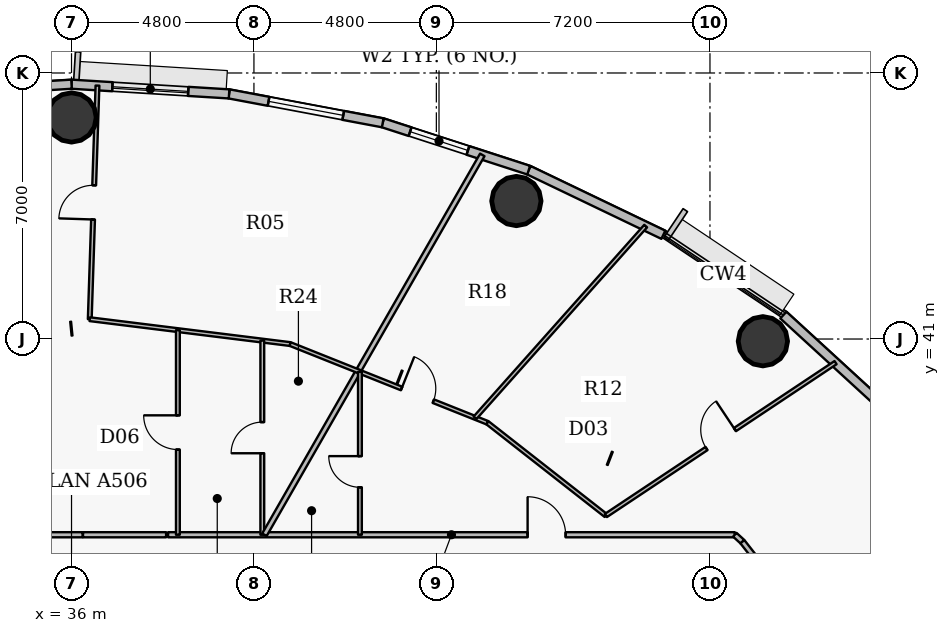
"""IFC4 building model, lengths in metres.
Left out: names, types, materials, properties, quantities, classifications, styles, units other than length and angle.
Written with IfcOpenShell. Run it as: python <this file> out.ifc"""

import sys

from ifc_helpers import new_model, si_unit, direction, frame, frame_2d, origin, origin_2d, place, context, subcontext, project, spatial, rectangle, hollow_circle, extrude, source, transform, mapped, element, fill, save


model = new_model("IFC4")
c1 = context("Model", 3, precision=1e-05, world=origin(), true_north=direction((0.0, 1.0)))
c2 = subcontext(c1, "Body", "Model", "MODEL_VIEW")
j1 = project(units=[si_unit("LENGTHUNIT", "METRE"), si_unit("PLANEANGLEUNIT", "RADIAN")], contexts=[c1])
p1 = place(None, origin())
s1 = spatial("IfcSite", under=j1, at=p1, CompositionType="ELEMENT")
p2 = place(p1, origin())
s2 = spatial("IfcBuilding", under=s1, at=p2, CompositionType="ELEMENT")
p3 = place(p2, frame((0.0, 0.0, 193.65)))
s3 = spatial("IfcBuildingStorey", under=s2, at=p3, CompositionType="ELEMENT", Elevation=193.65)
for number, where, z_axis, x_axis in (
    (1, (54.192, 40.942, 0.0), (0.0, 0.0, 1.0), (1.0, 0.0, 0.0)),
    (2, (47.706, 44.631, 0.0), (0.0, 0.0, 1.0), (1.0, 0.0, 0.0)),
    (3, (36.0, 46.83, 0.0), (0.0, 0.0, 1.0), (1.0, 0.0, 0.0)),
):
    element("IfcColumn", number, at=place(p3, frame(where, z_axis=z_axis, x_axis=x_axis)), inside=s3, PredefinedType="COLUMN", context=c2, shape_type="SweptSolid", body=[
        extrude(hollow_circle(Radius=0.65, WallThickness=0.04, at=origin_2d()), origin(), (0.0, 0.0, 1.0), 3.75),
    ])
p4 = place(p3, frame((54.732, 41.631, 0.0), z_axis=(0.0, 0.0, 1.0), x_axis=(0.737076565834, -0.675809245349, 0.0)))
e4 = element("IfcWall", 4, at=p4, inside=s3, PredefinedType="SOLIDWALL", context=c2, shape_type="SweptSolid", body=[
    extrude(rectangle(XDim=3.658, YDim=0.24, at=frame_2d((1.829, 0.0))), origin(), (0.0, 0.0, 1.0), 3.5),
])
p5 = place(p3, frame((48.03, 45.444, 0.0), z_axis=(0.0, 0.0, 1.0), x_axis=(0.901564733809, -0.432644231155, 0.0)))
e5 = element("IfcWall", 5, at=p5, inside=s3, PredefinedType="SOLIDWALL", context=c2, shape_type="SweptSolid", body=[
    extrude(rectangle(XDim=3.93, YDim=0.24, at=frame_2d((1.965, 0.0))), origin(), (0.0, 0.0, 1.0), 3.5),
])
p6 = place(p3, frame((44.189, 46.689, 0.0), z_axis=(0.0, 0.0, 1.0), x_axis=(0.951209870236, -0.30854462038, 0.0)))
e6 = element("IfcWall", 6, at=p6, inside=s3, PredefinedType="SOLIDWALL", context=c2, shape_type="SweptSolid", body=[
    extrude(rectangle(XDim=4.038, YDim=0.24, at=frame_2d((2.019, 0.0))), origin(), (0.0, 0.0, 1.0), 3.5),
])
p7 = place(p6, frame((0.757, 0.0, 0.9)))
e7 = element("IfcOpeningElement", 7, at=p7, cuts=e6, PredefinedType="OPENING", context=c2, shape_type="SweptSolid", body=[
    extrude(rectangle(XDim=1.6, YDim=1.75, at=origin_2d()), frame((0.8, 0.13, 0.875), z_axis=(0.0, -1.0, 0.0), x_axis=(1.0, 0.0, 0.0)), (0.0, 0.0, 1.0), 0.26),
])
p8 = place(p3, frame((40.146, 47.449, 0.0), z_axis=(0.0, 0.0, 1.0), x_axis=(0.982788108205, -0.184736391573, 0.0)))
e8 = element("IfcWall", 8, at=p8, inside=s3, PredefinedType="SOLIDWALL", context=c2, shape_type="SweptSolid", body=[
    extrude(rectangle(XDim=4.114, YDim=0.24, at=frame_2d((2.057, 0.0))), origin(), (0.0, 0.0, 1.0), 3.5),
])
p9 = place(p8, frame((1.057, 0.0, 0.9)))
e9 = element("IfcOpeningElement", 9, at=p9, cuts=e8, PredefinedType="OPENING", context=c2, shape_type="SweptSolid", body=[
    extrude(rectangle(XDim=2.0, YDim=1.75, at=origin_2d()), frame((1.0, 0.13, 0.875), z_axis=(0.0, -1.0, 0.0), x_axis=(1.0, 0.0, 0.0)), (0.0, 0.0, 1.0), 0.26),
])
p10 = place(p3, frame((36.0, 47.705, 0.0), z_axis=(0.0, 0.0, 1.0), x_axis=(0.998104600619, -0.061540281305, 0.0)))
e10 = element("IfcWall", 10, at=p10, inside=s3, PredefinedType="SOLIDWALL", context=c2, shape_type="SweptSolid", body=[
    extrude(rectangle(XDim=4.154, YDim=0.24, at=frame_2d((2.077, 0.0))), origin(), (0.0, 0.0, 1.0), 3.5),
])
p11 = place(p10, frame((1.077, 0.0, 0.9)))
e11 = element("IfcOpeningElement", 11, at=p11, cuts=e10, PredefinedType="OPENING", context=c2, shape_type="SweptSolid", body=[
    extrude(rectangle(XDim=2.0, YDim=1.75, at=origin_2d()), frame((1.0, 0.13, 0.875), z_axis=(0.0, -1.0, 0.0), x_axis=(1.0, 0.0, 0.0)), (0.0, 0.0, 1.0), 0.26),
])
p12 = place(p3, frame((31.854, 47.449, 0.0), z_axis=(0.0, 0.0, 1.0), x_axis=(0.998104600619, 0.061540281305, 0.0)))
e12 = element("IfcWall", 12, at=p12, inside=s3, PredefinedType="SOLIDWALL", context=c2, shape_type="SweptSolid", body=[
    extrude(rectangle(XDim=4.154, YDim=0.24, at=frame_2d((2.077, 0.0))), origin(), (0.0, 0.0, 1.0), 3.5),
])
p13 = place(p12, frame((1.077, 0.0, 0.9)))
e13 = element("IfcOpeningElement", 13, at=p13, cuts=e12, PredefinedType="OPENING", context=c2, shape_type="SweptSolid", body=[
    extrude(rectangle(XDim=2.0, YDim=1.75, at=origin_2d()), frame((1.0, 0.13, 0.875), z_axis=(0.0, -1.0, 0.0), x_axis=(1.0, 0.0, 0.0)), (0.0, 0.0, 1.0), 0.26),
])
p14 = place(p3, frame((24.35, 35.85, 0.0), z_axis=(0.0, 0.0, 1.0), x_axis=(1.0, 0.0, 0.0)))
e14 = element("IfcWall", 14, at=p14, inside=s3, PredefinedType="PARTITIONING", context=c2, shape_type="SweptSolid", body=[
    extrude(rectangle(XDim=11.942, YDim=0.135, at=frame_2d((5.971, 0.0))), origin(), (0.0, 0.0, 1.0), 2.935),
])
p15 = place(p14, frame((5.471, 0.0, 0.0)))
e15 = element("IfcOpeningElement", 15, at=p15, cuts=e14, PredefinedType="OPENING", context=c2, shape_type="SweptSolid", body=[
    extrude(rectangle(XDim=1.0, YDim=2.15, at=origin_2d()), frame((0.5, 0.078, 1.075), z_axis=(0.0, -1.0, 0.0), x_axis=(1.0, 0.0, 0.0)), (0.0, 0.0, 1.0), 0.155),
])
p16 = place(p3, frame((36.48, 41.521, 0.0), z_axis=(0.0, 0.0, 1.0), x_axis=(0.033029315495, 0.99945438331, 0.0)))
e16 = element("IfcWall", 16, at=p16, inside=s3, PredefinedType="PARTITIONING", context=c2, shape_type="SweptSolid", body=[
    extrude(rectangle(XDim=6.15, YDim=0.1, at=frame_2d((3.075, 0.0))), origin(), (0.0, 0.0, 1.0), 2.935),
])
p17 = place(p16, frame((2.625, 0.0, 0.0)))
e17 = element("IfcOpeningElement", 17, at=p17, cuts=e16, PredefinedType="OPENING", context=c2, shape_type="SweptSolid", body=[
    extrude(rectangle(XDim=0.9, YDim=2.1, at=origin_2d()), frame((0.45, 0.06, 1.05), z_axis=(0.0, -1.0, 0.0), x_axis=(1.0, 0.0, 0.0)), (0.0, 0.0, 1.0), 0.12),
])
p18 = place(p3, frame((36.48, 41.521, 0.0), z_axis=(0.0, 0.0, 1.0), x_axis=(0.992397562131, -0.123073468612, 0.0)))
e18 = element("IfcWall", 18, at=p18, inside=s3, PredefinedType="PARTITIONING", context=c2, shape_type="SweptSolid", body=[
    extrude(rectangle(XDim=5.314, YDim=0.1, at=frame_2d((2.657, 0.0))), origin(), (0.0, 0.0, 1.0), 3.5),
])
p19 = place(p3, frame((38.541, 35.85, 0.0), z_axis=(0.0, 0.0, 1.0), x_axis=(1.0, 0.0, 0.0)))
e19 = element("IfcWall", 19, at=p19, inside=s3, PredefinedType="PARTITIONING", context=c2, shape_type="SweptSolid", body=[
    extrude(rectangle(XDim=14.913, YDim=0.135, at=frame_2d((7.456, 0.0))), origin(), (0.0, 0.0, 1.0), 2.935),
])
p20 = place(p19, frame((9.46, 0.0, 0.0)))
e20 = element("IfcOpeningElement", 20, at=p20, cuts=e19, PredefinedType="OPENING", context=c2, shape_type="SweptSolid", body=[
    extrude(rectangle(XDim=1.0, YDim=2.15, at=origin_2d()), frame((0.5, 0.078, 1.075), z_axis=(0.0, -1.0, 0.0), x_axis=(1.0, 0.0, 0.0)), (0.0, 0.0, 1.0), 0.155),
])
p21 = place(p3, frame((38.799, 35.85, 0.0), z_axis=(0.0, 0.0, 1.0), x_axis=(0.0, 1.0, 0.0)))
e21 = element("IfcWall", 21, at=p21, inside=s3, PredefinedType="PARTITIONING", context=c2, shape_type="SweptSolid", body=[
    extrude(rectangle(XDim=5.384, YDim=0.1, at=frame_2d((2.692, 0.0))), origin(), (0.0, 0.0, 1.0), 3.5),
])
p22 = place(p21, frame((2.242, 0.0, 0.0)))
e22 = element("IfcOpeningElement", 22, at=p22, cuts=e21, PredefinedType="OPENING", context=c2, shape_type="SweptSolid", body=[
    extrude(rectangle(XDim=0.9, YDim=2.1, at=origin_2d()), frame((0.45, 0.06, 1.05), z_axis=(0.0, -1.0, 0.0), x_axis=(1.0, 0.0, 0.0)), (0.0, 0.0, 1.0), 0.12),
])
p23 = place(p3, frame((41.02, 35.85, 0.0), z_axis=(0.0, 0.0, 1.0), x_axis=(0.0, 1.0, 0.0)))
e23 = element("IfcWall", 23, at=p23, inside=s3, PredefinedType="PARTITIONING", context=c2, shape_type="SweptSolid", body=[
    extrude(rectangle(XDim=5.108, YDim=0.1, at=frame_2d((2.554, 0.0))), origin(), (0.0, 0.0, 1.0), 3.5),
])
p24 = place(p23, frame((2.144, 0.0, 0.0)))
e24 = element("IfcOpeningElement", 24, at=p24, cuts=e23, PredefinedType="OPENING", context=c2, shape_type="SweptSolid", body=[
    extrude(rectangle(XDim=0.82, YDim=2.1, at=origin_2d()), frame((0.41, 0.06, 1.05), z_axis=(0.0, -1.0, 0.0), x_axis=(1.0, 0.0, 0.0)), (0.0, 0.0, 1.0), 0.12),
])
p25 = place(p3, frame((41.076, 35.85, 0.0), z_axis=(0.0, 0.0, 1.0), x_axis=(0.497557605347, 0.867430936364, 0.0)))
e25 = element("IfcWall", 25, at=p25, inside=s3, PredefinedType="PARTITIONING", context=c2, shape_type="SweptSolid", body=[
    extrude(rectangle(XDim=11.522, YDim=0.135, at=frame_2d((5.761, 0.0))), origin(), (0.0, 0.0, 1.0), 2.935),
])
p26 = place(p3, frame((41.754, 40.867, 0.0), z_axis=(0.0, 0.0, 1.0), x_axis=(0.928792710591, -0.370599650233, 0.0)))
e26 = element("IfcWall", 26, at=p26, inside=s3, PredefinedType="PARTITIONING", context=c2, shape_type="SweptSolid", body=[
    extrude(rectangle(XDim=5.588, YDim=0.1, at=frame_2d((2.794, 0.0))), origin(), (0.0, 0.0, 1.0), 2.935),
])
p27 = place(p26, frame((3.156, 0.0, 0.0)))
e27 = element("IfcOpeningElement", 27, at=p27, cuts=e26, PredefinedType="OPENING", context=c2, shape_type="SweptSolid", body=[
    extrude(rectangle(XDim=0.9, YDim=2.1, at=origin_2d()), frame((0.45, 0.06, 1.05), z_axis=(0.0, -1.0, 0.0), x_axis=(1.0, 0.0, 0.0)), (0.0, 0.0, 1.0), 0.12),
])
p28 = place(p3, frame((43.589, 35.85, 0.0), z_axis=(0.0, 0.0, 1.0), x_axis=(0.0, 1.0, 0.0)))
e28 = element("IfcWall", 28, at=p28, inside=s3, PredefinedType="PARTITIONING", context=c2, shape_type="SweptSolid", body=[
    extrude(rectangle(XDim=4.285, YDim=0.1, at=frame_2d((2.143, 0.0))), origin(), (0.0, 0.0, 1.0), 2.935),
])
p29 = place(p28, frame((1.249, 0.0, 0.0)))
e29 = element("IfcOpeningElement", 29, at=p29, cuts=e28, PredefinedType="OPENING", context=c2, shape_type="SweptSolid", body=[
    extrude(rectangle(XDim=0.82, YDim=2.1, at=origin_2d()), frame((0.41, 0.06, 1.05), z_axis=(0.0, -1.0, 0.0), x_axis=(1.0, 0.0, 0.0)), (0.0, 0.0, 1.0), 0.12),
])
p30 = place(p3, frame((46.617, 38.927, 0.0), z_axis=(0.0, 0.0, 1.0), x_axis=(0.664908846083, 0.746924511849, 0.0)))
e30 = element("IfcWall", 30, at=p30, inside=s3, PredefinedType="PARTITIONING", context=c2, shape_type="SweptSolid", body=[
    extrude(rectangle(XDim=6.754, YDim=0.1, at=frame_2d((3.377, 0.0))), origin(), (0.0, 0.0, 1.0), 2.935),
])
p31 = place(p3, frame((46.945, 38.796, 0.0), z_axis=(0.0, 0.0, 1.0), x_axis=(0.787314896848, -0.616551095369, 0.0)))
e31 = element("IfcWall", 31, at=p31, inside=s3, PredefinedType="PARTITIONING", context=c2, shape_type="SweptSolid", body=[
    extrude(rectangle(XDim=3.958, YDim=0.1, at=frame_2d((1.979, 0.0))), origin(), (0.0, 0.0, 1.0), 2.935),
])
p32 = place(p3, frame((50.06, 36.356, 0.0), z_axis=(0.0, 0.0, 1.0), x_axis=(0.832520763353, 0.553993843455, 0.0)))
e32 = element("IfcWall", 32, at=p32, inside=s3, PredefinedType="PARTITIONING", context=c2, shape_type="SweptSolid", body=[
    extrude(rectangle(XDim=7.26, YDim=0.1, at=frame_2d((3.63, 0.0))), origin(), (0.0, 0.0, 1.0), 2.935),
])
p33 = place(p32, frame((3.18, 0.0, 0.0)))
e33 = element("IfcOpeningElement", 33, at=p33, cuts=e32, PredefinedType="OPENING", context=c2, shape_type="SweptSolid", body=[
    extrude(rectangle(XDim=0.9, YDim=2.1, at=origin_2d()), frame((0.45, 0.06, 1.05), z_axis=(0.0, -1.0, 0.0), x_axis=(1.0, 0.0, 0.0)), (0.0, 0.0, 1.0), 0.12),
])
p34 = place(p3, frame((53.454, 35.85, 0.0), z_axis=(0.0, 0.0, 1.0), x_axis=(0.736667385572, -0.676255249913, 0.0)))
e34 = element("IfcWall", 34, at=p34, inside=s3, PredefinedType="PARTITIONING", context=c2, shape_type="SweptSolid", body=[
    extrude(rectangle(XDim=0.271, YDim=0.135, at=frame_2d((0.135, 0.0))), origin(), (0.0, 0.0, 1.0), 3.5),
])
p35 = place(p3, frame((53.653, 35.667, 0.0), z_axis=(0.0, 0.0, 1.0), x_axis=(0.616302223209, -0.787509726713, 0.0)))
e35 = element("IfcWall", 35, at=p35, inside=s3, PredefinedType="PARTITIONING", context=c2, shape_type="SweptSolid", body=[
    extrude(rectangle(XDim=2.18, YDim=0.135, at=frame_2d((1.09, 0.0))), origin(), (0.0, 0.0, 1.0), 3.5),
])
p36 = place(p3, frame((36.302, 35.85, 0.0), z_axis=(0.0, 0.0, 1.0), x_axis=(1.0, 0.0, 0.0)))
e36 = element("IfcWall", 36, at=p36, inside=s3, PredefinedType="PARTITIONING", context=c2, shape_type="SweptSolid", body=[
    extrude(rectangle(XDim=2.187, YDim=0.135, at=frame_2d((1.093, 0.0))), origin(), (0.0, 0.0, 1.0), 3.5),
])
m1 = source(origin(), c2, "Body", "SweptSolid", [
    extrude(rectangle(XDim=1.6, YDim=1.75, at=origin_2d()), frame((0.8, 0.03, 0.875), z_axis=(0.0, -1.0, 0.0), x_axis=(1.0, 0.0, 0.0)), (0.0, 0.0, 1.0), 0.06),
])
p37 = place(p7, origin())
e37 = element("IfcWindow", 37, at=p37, inside=s3, PartitioningType="DOUBLE_PANEL_VERTICAL", PredefinedType="WINDOW", context=c2, shape_type="MappedRepresentation", body=[
    mapped(m1, transform((0.0, 0.0, 0.0), x_axis=(1.0, 0.0, 0.0), y_axis=(0.0, 1.0, 0.0), z_axis=(0.0, 0.0, 1.0), scale=1.0)),
])
fill(e7, e37)
m2 = source(origin(), c2, "Body", "SweptSolid", [
    extrude(rectangle(XDim=2.0, YDim=1.75, at=origin_2d()), frame((1.0, 0.03, 0.875), z_axis=(0.0, -1.0, 0.0), x_axis=(1.0, 0.0, 0.0)), (0.0, 0.0, 1.0), 0.06),
])
p38 = place(p9, origin())
e38 = element("IfcWindow", 38, at=p38, inside=s3, PartitioningType="DOUBLE_PANEL_VERTICAL", PredefinedType="WINDOW", context=c2, shape_type="MappedRepresentation", body=[
    mapped(m2, transform((0.0, 0.0, 0.0), x_axis=(1.0, 0.0, 0.0), y_axis=(0.0, 1.0, 0.0), z_axis=(0.0, 0.0, 1.0), scale=1.0)),
])
fill(e9, e38)
p39 = place(p11, origin())
e39 = element("IfcWindow", 39, at=p39, inside=s3, PartitioningType="DOUBLE_PANEL_VERTICAL", PredefinedType="WINDOW", context=c2, shape_type="MappedRepresentation", body=[
    mapped(m2, transform((0.0, 0.0, 0.0), x_axis=(1.0, 0.0, 0.0), y_axis=(0.0, 1.0, 0.0), z_axis=(0.0, 0.0, 1.0), scale=1.0)),
])
fill(e11, e39)
m3 = source(origin(), c2, "Body", "SweptSolid", [
    extrude(rectangle(XDim=1.0, YDim=2.15, at=origin_2d()), frame((0.5, 0.025, 1.075), z_axis=(0.0, -1.0, 0.0), x_axis=(1.0, 0.0, 0.0)), (0.0, 0.0, 1.0), 0.05),
])
p40 = place(p20, origin())
e40 = element("IfcDoor", 40, at=p40, inside=s3, OperationType="SINGLE_SWING_LEFT", PredefinedType="DOOR", context=c2, shape_type="MappedRepresentation", body=[
    mapped(m3, transform((0.0, 0.0, 0.0), x_axis=(1.0, 0.0, 0.0), y_axis=(0.0, 1.0, 0.0), z_axis=(0.0, 0.0, 1.0), scale=1.0)),
])
fill(e20, e40)
m4 = source(origin(), c2, "Body", "SweptSolid", [
    extrude(rectangle(XDim=0.9, YDim=2.1, at=origin_2d()), frame((0.45, 0.025, 1.05), z_axis=(0.0, -1.0, 0.0), x_axis=(1.0, 0.0, 0.0)), (0.0, 0.0, 1.0), 0.05),
])
p41 = place(p33, origin())
e41 = element("IfcDoor", 41, at=p41, inside=s3, OperationType="SINGLE_SWING_RIGHT", PredefinedType="DOOR", context=c2, shape_type="MappedRepresentation", body=[
    mapped(m4, transform((0.0, 0.0, 0.0), x_axis=(1.0, 0.0, 0.0), y_axis=(0.0, 1.0, 0.0), z_axis=(0.0, 0.0, 1.0), scale=1.0)),
])
fill(e33, e41)
p42 = place(p27, origin())
e42 = element("IfcDoor", 42, at=p42, inside=s3, OperationType="SINGLE_SWING_LEFT", PredefinedType="DOOR", context=c2, shape_type="MappedRepresentation", body=[
    mapped(m4, transform((0.0, 0.0, 0.0), x_axis=(1.0, 0.0, 0.0), y_axis=(0.0, 1.0, 0.0), z_axis=(0.0, 0.0, 1.0), scale=1.0)),
])
fill(e27, e42)
m5 = source(origin(), c2, "Body", "SweptSolid", [
    extrude(rectangle(XDim=0.82, YDim=2.1, at=origin_2d()), frame((0.41, 0.025, 1.05), z_axis=(0.0, -1.0, 0.0), x_axis=(1.0, 0.0, 0.0)), (0.0, 0.0, 1.0), 0.05),
])
p43 = place(p29, origin())
e43 = element("IfcDoor", 43, at=p43, inside=s3, OperationType="SINGLE_SWING_RIGHT", PredefinedType="DOOR", context=c2, shape_type="MappedRepresentation", body=[
    mapped(m5, transform((0.0, 0.0, 0.0), x_axis=(1.0, 0.0, 0.0), y_axis=(0.0, 1.0, 0.0), z_axis=(0.0, 0.0, 1.0), scale=1.0)),
])
fill(e29, e43)
p44 = place(p17, origin())
e44 = element("IfcDoor", 44, at=p44, inside=s3, OperationType="SINGLE_SWING_LEFT", PredefinedType="DOOR", context=c2, shape_type="MappedRepresentation", body=[
    mapped(m4, transform((0.0, 0.0, 0.0), x_axis=(1.0, 0.0, 0.0), y_axis=(0.0, 1.0, 0.0), z_axis=(0.0, 0.0, 1.0), scale=1.0)),
])
fill(e17, e44)
p45 = place(p22, origin())
e45 = element("IfcDoor", 45, at=p45, inside=s3, OperationType="SINGLE_SWING_RIGHT", PredefinedType="DOOR", context=c2, shape_type="MappedRepresentation", body=[
    mapped(m4, transform((0.0, 0.0, 0.0), x_axis=(1.0, 0.0, 0.0), y_axis=(0.0, 1.0, 0.0), z_axis=(0.0, 0.0, 1.0), scale=1.0)),
])
fill(e22, e45)
p46 = place(p24, origin())
e46 = element("IfcDoor", 46, at=p46, inside=s3, OperationType="SINGLE_SWING_LEFT", PredefinedType="DOOR", context=c2, shape_type="MappedRepresentation", body=[
    mapped(m5, transform((0.0, 0.0, 0.0), x_axis=(1.0, 0.0, 0.0), y_axis=(0.0, 1.0, 0.0), z_axis=(0.0, 0.0, 1.0), scale=1.0)),
])
fill(e24, e46)
save(model, sys.argv[1])
